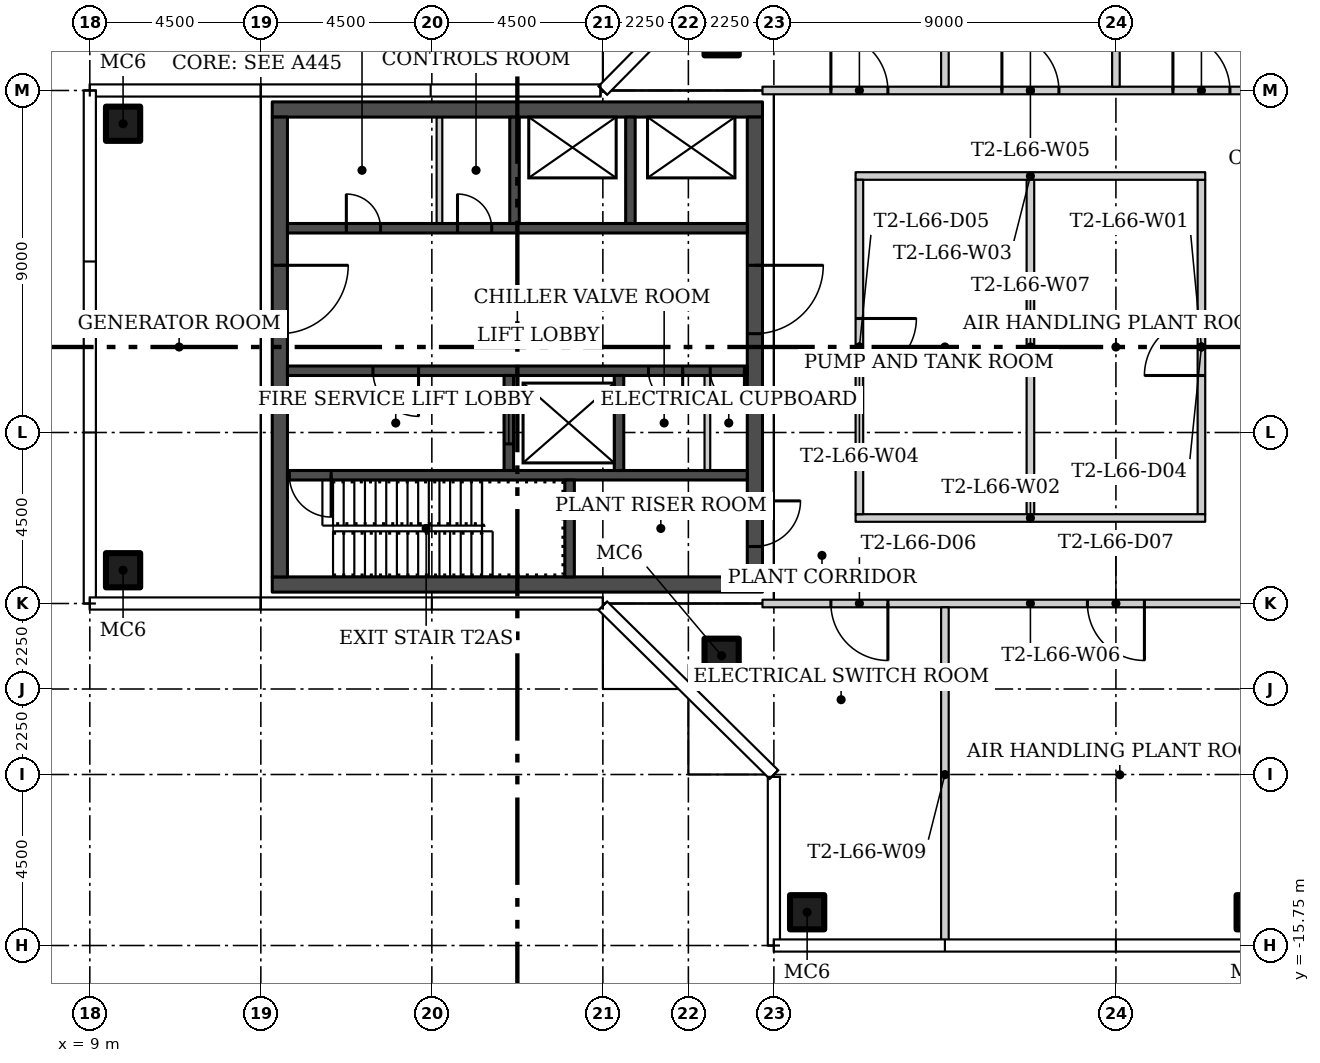
"""IFC4 building model, lengths in metres.
Left out: names, types, materials, properties, quantities, classifications, styles, units other than length and angle.
Written with IfcOpenShell. Run it as: python <this file> out.ifc"""

import sys

from ifc_helpers import new_model, si_unit, direction, frame, frame_2d, origin, origin_2d, place, context, subcontext, project, spatial, rectangle, hollow_rectangle, extrude, element, fill, save


model = new_model("IFC4")
c1 = context("Model", 3, precision=1e-05, world=origin(), true_north=direction((0.0, 1.0)))
c2 = subcontext(c1, "Body", "Model", "MODEL_VIEW")
j1 = project(units=[si_unit("LENGTHUNIT", "METRE"), si_unit("PLANEANGLEUNIT", "RADIAN")], contexts=[c1])
p1 = place(None, origin())
s1 = spatial("IfcSite", under=j1, at=p1, CompositionType="ELEMENT")
p2 = place(p1, origin())
s2 = spatial("IfcBuilding", under=s1, at=p2, CompositionType="ELEMENT")
p3 = place(p2, frame((0.0, 0.0, 273.3)))
s3 = spatial("IfcBuildingStorey", under=s2, at=p3, CompositionType="ELEMENT", Elevation=273.3)
for number, where in (
    (1, (25.625, 8.125, 0.0)),
    (2, (25.625, -8.125, 0.0)),
    (3, (39.625, -14.875, 0.0)),
    (4, (27.875, -14.875, 0.0)),
    (5, (9.875, -5.875, 0.0)),
    (6, (9.875, 5.875, 0.0)),
):
    element("IfcColumn", number, at=place(p3, frame(where)), inside=s3, PredefinedType="COLUMN", context=c2, shape_type="SweptSolid", body=[
        extrude(hollow_rectangle(XDim=0.9, YDim=0.9, WallThickness=0.036, at=origin_2d()), origin(), (0.0, 0.0, 1.0), 4.55),
    ])
p4 = place(p3, frame((38.25, -4.4, 0.0), z_axis=(0.0, 0.0, 1.0), x_axis=(0.0, 1.0, 0.0)))
e7 = element("IfcWall", 7, at=p4, inside=s3, PredefinedType="PARTITIONING", context=c2, shape_type="SweptSolid", body=[
    extrude(rectangle(XDim=8.8, YDim=0.2, at=frame_2d((4.4, 0.0))), origin(), (0.0, 0.0, 1.0), 4.55),
])
p5 = place(p4, frame((3.65, 0.0, 0.0)))
e8 = element("IfcOpeningElement", 8, at=p5, cuts=e7, PredefinedType="OPENING", context=c2, shape_type="SweptSolid", body=[
    extrude(rectangle(XDim=1.5, YDim=2.4, at=frame_2d((0.75, 1.2))), frame((0.0, 0.11, 0.0), z_axis=(0.0, -1.0, 0.0), x_axis=(1.0, 0.0, 0.0)), (0.0, 0.0, 1.0), 0.22),
])
p6 = place(p3, frame((29.15, -4.5, 0.0)))
e9 = element("IfcWall", 9, at=p6, inside=s3, PredefinedType="PARTITIONING", context=c2, shape_type="SweptSolid", body=[
    extrude(rectangle(XDim=9.2, YDim=0.2, at=frame_2d((4.6, 0.0))), origin(), (0.0, 0.0, 1.0), 4.55),
])
p7 = place(p3, frame((38.35, 4.5, 0.0), z_axis=(0.0, 0.0, 1.0), x_axis=(-1.0, 0.0, 0.0)))
e10 = element("IfcWall", 10, at=p7, inside=s3, PredefinedType="PARTITIONING", context=c2, shape_type="SweptSolid", body=[
    extrude(rectangle(XDim=9.2, YDim=0.2, at=frame_2d((4.6, 0.0))), origin(), (0.0, 0.0, 1.0), 4.55),
])
p8 = place(p3, frame((29.25, 4.4, 0.0), z_axis=(0.0, 0.0, 1.0), x_axis=(0.0, -1.0, 0.0)))
e11 = element("IfcWall", 11, at=p8, inside=s3, PredefinedType="PARTITIONING", context=c2, shape_type="SweptSolid", body=[
    extrude(rectangle(XDim=8.8, YDim=0.2, at=frame_2d((4.4, 0.0))), origin(), (0.0, 0.0, 1.0), 4.55),
])
p9 = place(p8, frame((3.65, 0.0, 0.0)))
e12 = element("IfcOpeningElement", 12, at=p9, cuts=e11, PredefinedType="OPENING", context=c2, shape_type="SweptSolid", body=[
    extrude(rectangle(XDim=1.5, YDim=2.4, at=frame_2d((0.75, 1.2))), frame((0.0, 0.11, 0.0), z_axis=(0.0, -1.0, 0.0), x_axis=(1.0, 0.0, 0.0)), (0.0, 0.0, 1.0), 0.22),
])
p10 = place(p3, frame((26.7, 6.75, 0.0)))
e13 = element("IfcWall", 13, at=p10, inside=s3, PredefinedType="PARTITIONING", context=c2, shape_type="SweptSolid", body=[
    extrude(rectangle(XDim=14.1, YDim=0.2, at=frame_2d((7.05, 0.0))), origin(), (0.0, 0.0, 1.0), 4.55),
])
p11 = place(p10, frame((10.8, 0.0, 0.0)))
e14 = element("IfcOpeningElement", 14, at=p11, cuts=e13, PredefinedType="OPENING", context=c2, shape_type="SweptSolid", body=[
    extrude(rectangle(XDim=1.5, YDim=2.4, at=frame_2d((0.75, 1.2))), frame((0.0, 0.11, 0.0), z_axis=(0.0, -1.0, 0.0), x_axis=(1.0, 0.0, 0.0)), (0.0, 0.0, 1.0), 0.22),
])
p12 = place(p10, frame((6.3, 0.0, 0.0)))
e15 = element("IfcOpeningElement", 15, at=p12, cuts=e13, PredefinedType="OPENING", context=c2, shape_type="SweptSolid", body=[
    extrude(rectangle(XDim=1.5, YDim=2.4, at=frame_2d((0.75, 1.2))), frame((0.0, 0.11, 0.0), z_axis=(0.0, -1.0, 0.0), x_axis=(1.0, 0.0, 0.0)), (0.0, 0.0, 1.0), 0.22),
])
p13 = place(p10, frame((1.8, 0.0, 0.0)))
e16 = element("IfcOpeningElement", 16, at=p13, cuts=e13, PredefinedType="OPENING", context=c2, shape_type="SweptSolid", body=[
    extrude(rectangle(XDim=1.5, YDim=2.4, at=frame_2d((0.75, 1.2))), frame((0.0, 0.11, 0.0), z_axis=(0.0, -1.0, 0.0), x_axis=(1.0, 0.0, 0.0)), (0.0, 0.0, 1.0), 0.22),
])
p14 = place(p3, frame((40.8, -6.75, 0.0), z_axis=(0.0, 0.0, 1.0), x_axis=(-1.0, 0.0, 0.0)))
e17 = element("IfcWall", 17, at=p14, inside=s3, PredefinedType="PARTITIONING", context=c2, shape_type="SweptSolid", body=[
    extrude(rectangle(XDim=14.1, YDim=0.2, at=frame_2d((7.05, 0.0))), origin(), (0.0, 0.0, 1.0), 4.55),
])
p15 = place(p14, frame((10.8, 0.0, 0.0)))
e18 = element("IfcOpeningElement", 18, at=p15, cuts=e17, PredefinedType="OPENING", context=c2, shape_type="SweptSolid", body=[
    extrude(rectangle(XDim=1.5, YDim=2.4, at=frame_2d((0.75, 1.2))), frame((0.0, 0.11, 0.0), z_axis=(0.0, -1.0, 0.0), x_axis=(1.0, 0.0, 0.0)), (0.0, 0.0, 1.0), 0.22),
])
p16 = place(p14, frame((4.05, 0.0, 0.0)))
e19 = element("IfcOpeningElement", 19, at=p16, cuts=e17, PredefinedType="OPENING", context=c2, shape_type="SweptSolid", body=[
    extrude(rectangle(XDim=1.5, YDim=2.4, at=frame_2d((0.75, 1.2))), frame((0.0, 0.11, 0.0), z_axis=(0.0, -1.0, 0.0), x_axis=(1.0, 0.0, 0.0)), (0.0, 0.0, 1.0), 0.22),
])
p17 = place(p3, frame((33.75, 4.4, 0.0), z_axis=(0.0, 0.0, 1.0), x_axis=(0.0, -1.0, 0.0)))
e20 = element("IfcWall", 20, at=p17, inside=s3, PredefinedType="PARTITIONING", context=c2, shape_type="SweptSolid", body=[
    extrude(rectangle(XDim=8.8, YDim=0.2, at=frame_2d((4.4, 0.0))), origin(), (0.0, 0.0, 1.0), 4.55),
])
p18 = place(p3, frame((36.0, 20.155, 0.0), z_axis=(0.0, 0.0, 1.0), x_axis=(0.0, -1.0, 0.0)))
e21 = element("IfcWall", 21, at=p18, inside=s3, PredefinedType="PARTITIONING", context=c2, shape_type="SweptSolid", body=[
    extrude(rectangle(XDim=13.305, YDim=0.2, at=frame_2d((6.652, 0.0))), origin(), (0.0, 0.0, 1.0), 4.55),
])
p19 = place(p3, frame((31.5, -6.85, 0.0), z_axis=(0.0, 0.0, 1.0), x_axis=(0.0, -1.0, 0.0)))
e22 = element("IfcWall", 22, at=p19, inside=s3, PredefinedType="PARTITIONING", context=c2, shape_type="SweptSolid", body=[
    extrude(rectangle(XDim=8.805, YDim=0.2, at=frame_2d((4.402, 0.0))), origin(), (0.0, 0.0, 1.0), 4.55),
])
p20 = place(p3, frame((31.5, 20.155, 0.0), z_axis=(0.0, 0.0, 1.0), x_axis=(0.0, -1.0, 0.0)))
e23 = element("IfcWall", 23, at=p20, inside=s3, PredefinedType="PARTITIONING", context=c2, shape_type="SweptSolid", body=[
    extrude(rectangle(XDim=13.305, YDim=0.2, at=frame_2d((6.652, 0.0))), origin(), (0.0, 0.0, 1.0), 4.55),
])
for number, where in (
    (24, (13.8, -6.25, 0.0)),
    (25, (13.8, 6.25, 0.0)),
):
    element("IfcWall", number, at=place(p3, frame(where)), inside=s3, PredefinedType="SHEAR", context=c2, shape_type="SweptSolid", body=[
        extrude(rectangle(XDim=12.9, YDim=0.4, at=frame_2d((6.45, 0.0))), origin(), (0.0, 0.0, 1.0), 4.55),
    ])
p21 = place(p3, frame((14.0, 6.05, 0.0), z_axis=(0.0, 0.0, 1.0), x_axis=(0.0, -1.0, 0.0)))
e26 = element("IfcWall", 26, at=p21, inside=s3, PredefinedType="SHEAR", context=c2, shape_type="SweptSolid", body=[
    extrude(rectangle(XDim=12.1, YDim=0.4, at=frame_2d((6.05, 0.0))), origin(), (0.0, 0.0, 1.0), 4.55),
])
p22 = place(p21, frame((3.9, 0.0, 0.0)))
e27 = element("IfcOpeningElement", 27, at=p22, cuts=e26, PredefinedType="OPENING", context=c2, shape_type="SweptSolid", body=[
    extrude(rectangle(XDim=1.8, YDim=2.4, at=frame_2d((0.9, 1.2))), frame((0.0, 0.21, 0.0), z_axis=(0.0, -1.0, 0.0), x_axis=(1.0, 0.0, 0.0)), (0.0, 0.0, 1.0), 0.42),
])
p23 = place(p3, frame((26.5, 6.05, 0.0), z_axis=(0.0, 0.0, 1.0), x_axis=(0.0, -1.0, 0.0)))
e28 = element("IfcWall", 28, at=p23, inside=s3, PredefinedType="SHEAR", context=c2, shape_type="SweptSolid", body=[
    extrude(rectangle(XDim=12.1, YDim=0.4, at=frame_2d((6.05, 0.0))), origin(), (0.0, 0.0, 1.0), 4.55),
])
p24 = place(p23, frame((10.1, 0.0, 0.0)))
e29 = element("IfcOpeningElement", 29, at=p24, cuts=e28, PredefinedType="OPENING", context=c2, shape_type="SweptSolid", body=[
    extrude(rectangle(XDim=1.2, YDim=2.1, at=frame_2d((0.6, 1.05))), frame((0.0, 0.21, 0.0), z_axis=(0.0, -1.0, 0.0), x_axis=(1.0, 0.0, 0.0)), (0.0, 0.0, 1.0), 0.42),
])
p25 = place(p23, frame((3.9, 0.0, 0.0)))
e30 = element("IfcOpeningElement", 30, at=p25, cuts=e28, PredefinedType="OPENING", context=c2, shape_type="SweptSolid", body=[
    extrude(rectangle(XDim=1.8, YDim=2.4, at=frame_2d((0.9, 1.2))), frame((0.0, 0.21, 0.0), z_axis=(0.0, -1.0, 0.0), x_axis=(1.0, 0.0, 0.0)), (0.0, 0.0, 1.0), 0.42),
])
p26 = place(p3, frame((26.3, -3.375, 0.0), z_axis=(0.0, 0.0, 1.0), x_axis=(-1.0, 0.0, 0.0)))
e31 = element("IfcWall", 31, at=p26, inside=s3, PredefinedType="SHEAR", context=c2, shape_type="SweptSolid", body=[
    extrude(rectangle(XDim=12.1, YDim=0.25, at=frame_2d((6.05, 0.0))), origin(), (0.0, 0.0, 1.0), 4.55),
])
p27 = place(p26, frame((10.95, 0.0, 0.0)))
e32 = element("IfcOpeningElement", 32, at=p27, cuts=e31, PredefinedType="OPENING", context=c2, shape_type="SweptSolid", body=[
    extrude(rectangle(XDim=1.1, YDim=2.1, at=frame_2d((0.55, 1.05))), frame((0.0, 0.135, 0.0), z_axis=(0.0, -1.0, 0.0), x_axis=(1.0, 0.0, 0.0)), (0.0, 0.0, 1.0), 0.27),
])
p28 = place(p3, frame((21.625, -6.05, 0.0), z_axis=(0.0, 0.0, 1.0), x_axis=(0.0, 1.0, 0.0)))
e33 = element("IfcWall", 33, at=p28, inside=s3, PredefinedType="SHEAR", context=c2, shape_type="SweptSolid", body=[
    extrude(rectangle(XDim=2.55, YDim=0.25, at=frame_2d((1.275, 0.0))), origin(), (0.0, 0.0, 1.0), 4.55),
])
p29 = place(p3, frame((26.3, -0.625, 0.0), z_axis=(0.0, 0.0, 1.0), x_axis=(-1.0, 0.0, 0.0)))
e34 = element("IfcWall", 34, at=p29, inside=s3, PredefinedType="SHEAR", context=c2, shape_type="SweptSolid", body=[
    extrude(rectangle(XDim=12.1, YDim=0.25, at=frame_2d((6.05, 0.0))), origin(), (0.0, 0.0, 1.0), 4.55),
])
p30 = place(p29, frame((8.65, 0.0, 0.0)))
e35 = element("IfcOpeningElement", 35, at=p30, cuts=e34, PredefinedType="OPENING", context=c2, shape_type="SweptSolid", body=[
    extrude(rectangle(XDim=1.2, YDim=2.1, at=frame_2d((0.6, 1.05))), frame((0.0, 0.135, 0.0), z_axis=(0.0, -1.0, 0.0), x_axis=(1.0, 0.0, 0.0)), (0.0, 0.0, 1.0), 0.27),
])
p31 = place(p29, frame((1.7, 0.0, 0.0)))
e36 = element("IfcOpeningElement", 36, at=p31, cuts=e34, PredefinedType="OPENING", context=c2, shape_type="SweptSolid", body=[
    extrude(rectangle(XDim=0.9, YDim=2.1, at=frame_2d((0.45, 1.05))), frame((0.0, 0.135, 0.0), z_axis=(0.0, -1.0, 0.0), x_axis=(1.0, 0.0, 0.0)), (0.0, 0.0, 1.0), 0.27),
])
p32 = place(p29, frame((0.075, 0.0, 0.0)))
e37 = element("IfcOpeningElement", 37, at=p32, cuts=e34, PredefinedType="OPENING", context=c2, shape_type="SweptSolid", body=[
    extrude(rectangle(XDim=0.9, YDim=2.1, at=frame_2d((0.45, 1.05))), frame((0.0, 0.135, 0.0), z_axis=(0.0, -1.0, 0.0), x_axis=(1.0, 0.0, 0.0)), (0.0, 0.0, 1.0), 0.27),
])
p33 = place(p3, frame((20.025, -3.25, 0.0), z_axis=(0.0, 0.0, 1.0), x_axis=(0.0, 1.0, 0.0)))
e38 = element("IfcWall", 38, at=p33, inside=s3, PredefinedType="SHEAR", context=c2, shape_type="SweptSolid", body=[
    extrude(rectangle(XDim=2.5, YDim=0.25, at=frame_2d((1.25, 0.0))), origin(), (0.0, 0.0, 1.0), 4.55),
])
p34 = place(p33, frame((0.7, 0.0, 0.0)))
e39 = element("IfcOpeningElement", 39, at=p34, cuts=e38, PredefinedType="OPENING", context=c2, shape_type="SweptSolid", body=[
    extrude(rectangle(XDim=1.1, YDim=2.1, at=frame_2d((0.55, 1.05))), frame((0.0, 0.135, 0.0), z_axis=(0.0, -1.0, 0.0), x_axis=(1.0, 0.0, 0.0)), (0.0, 0.0, 1.0), 0.27),
])
p35 = place(p3, frame((22.925, -3.25, 0.0), z_axis=(0.0, 0.0, 1.0), x_axis=(0.0, 1.0, 0.0)))
e40 = element("IfcWall", 40, at=p35, inside=s3, PredefinedType="SHEAR", context=c2, shape_type="SweptSolid", body=[
    extrude(rectangle(XDim=2.5, YDim=0.25, at=frame_2d((1.25, 0.0))), origin(), (0.0, 0.0, 1.0), 4.55),
])
p36 = place(p3, frame((25.25, -3.25, 0.0), z_axis=(0.0, 0.0, 1.0), x_axis=(0.0, 1.0, 0.0)))
e41 = element("IfcWall", 41, at=p36, inside=s3, PredefinedType="PARTITIONING", context=c2, shape_type="SweptSolid", body=[
    extrude(rectangle(XDim=2.5, YDim=0.15, at=frame_2d((1.25, 0.0))), origin(), (0.0, 0.0, 1.0), 4.55),
])
p37 = place(p3, frame((14.2, 3.125, 0.0)))
e42 = element("IfcWall", 42, at=p37, inside=s3, PredefinedType="SHEAR", context=c2, shape_type="SweptSolid", body=[
    extrude(rectangle(XDim=12.1, YDim=0.25, at=frame_2d((6.05, 0.0))), origin(), (0.0, 0.0, 1.0), 4.55),
])
p38 = place(p37, frame((1.55, 0.0, 0.0)))
e43 = element("IfcOpeningElement", 43, at=p38, cuts=e42, PredefinedType="OPENING", context=c2, shape_type="SweptSolid", body=[
    extrude(rectangle(XDim=0.9, YDim=2.1, at=frame_2d((0.45, 1.05))), frame((0.0, 0.135, 0.0), z_axis=(0.0, -1.0, 0.0), x_axis=(1.0, 0.0, 0.0)), (0.0, 0.0, 1.0), 0.27),
])
p39 = place(p37, frame((4.475, 0.0, 0.0)))
e44 = element("IfcOpeningElement", 44, at=p39, cuts=e42, PredefinedType="OPENING", context=c2, shape_type="SweptSolid", body=[
    extrude(rectangle(XDim=0.9, YDim=2.1, at=frame_2d((0.45, 1.05))), frame((0.0, 0.135, 0.0), z_axis=(0.0, -1.0, 0.0), x_axis=(1.0, 0.0, 0.0)), (0.0, 0.0, 1.0), 0.27),
])
for number, where, z_axis, x_axis in (
    (45, (20.175, 3.25, 0.0), (0.0, 0.0, 1.0), (0.0, 1.0, 0.0)),
    (46, (23.225, 3.25, 0.0), (0.0, 0.0, 1.0), (0.0, 1.0, 0.0)),
):
    element("IfcWall", number, at=place(p3, frame(where, z_axis=z_axis, x_axis=x_axis)), inside=s3, PredefinedType="SHEAR", context=c2, shape_type="SweptSolid", body=[
        extrude(rectangle(XDim=2.8, YDim=0.25, at=frame_2d((1.4, 0.0))), origin(), (0.0, 0.0, 1.0), 4.55),
    ])
p40 = place(p3, frame((18.2, 3.25, 0.0), z_axis=(0.0, 0.0, 1.0), x_axis=(0.0, 1.0, 0.0)))
e47 = element("IfcWall", 47, at=p40, inside=s3, PredefinedType="PARTITIONING", context=c2, shape_type="SweptSolid", body=[
    extrude(rectangle(XDim=2.8, YDim=0.15, at=frame_2d((1.4, 0.0))), origin(), (0.0, 0.0, 1.0), 4.55),
])
p41 = place(p11, origin())
e48 = element("IfcDoor", 48, at=p41, inside=s3, OperationType="DOUBLE_DOOR_SINGLE_SWING", PredefinedType="DOOR", context=c2, shape_type="SweptSolid", body=[
    extrude(rectangle(XDim=1.5, YDim=2.4, at=frame_2d((0.75, 1.2))), frame((0.0, 0.025, 0.0), z_axis=(0.0, -1.0, 0.0), x_axis=(1.0, 0.0, 0.0)), (0.0, 0.0, 1.0), 0.05),
])
fill(e14, e48)
p42 = place(p12, origin())
e49 = element("IfcDoor", 49, at=p42, inside=s3, OperationType="DOUBLE_DOOR_SINGLE_SWING", PredefinedType="DOOR", context=c2, shape_type="SweptSolid", body=[
    extrude(rectangle(XDim=1.5, YDim=2.4, at=frame_2d((0.75, 1.2))), frame((0.0, 0.025, 0.0), z_axis=(0.0, -1.0, 0.0), x_axis=(1.0, 0.0, 0.0)), (0.0, 0.0, 1.0), 0.05),
])
fill(e15, e49)
p43 = place(p13, origin())
e50 = element("IfcDoor", 50, at=p43, inside=s3, OperationType="DOUBLE_DOOR_SINGLE_SWING", PredefinedType="DOOR", context=c2, shape_type="SweptSolid", body=[
    extrude(rectangle(XDim=1.5, YDim=2.4, at=frame_2d((0.75, 1.2))), frame((0.0, 0.025, 0.0), z_axis=(0.0, -1.0, 0.0), x_axis=(1.0, 0.0, 0.0)), (0.0, 0.0, 1.0), 0.05),
])
fill(e16, e50)
p44 = place(p5, origin())
e51 = element("IfcDoor", 51, at=p44, inside=s3, OperationType="DOUBLE_DOOR_SINGLE_SWING", PredefinedType="DOOR", context=c2, shape_type="SweptSolid", body=[
    extrude(rectangle(XDim=1.5, YDim=2.4, at=frame_2d((0.75, 1.2))), frame((0.0, 0.025, 0.0), z_axis=(0.0, -1.0, 0.0), x_axis=(1.0, 0.0, 0.0)), (0.0, 0.0, 1.0), 0.05),
])
fill(e8, e51)
p45 = place(p9, origin())
e52 = element("IfcDoor", 52, at=p45, inside=s3, OperationType="DOUBLE_DOOR_SINGLE_SWING", PredefinedType="DOOR", context=c2, shape_type="SweptSolid", body=[
    extrude(rectangle(XDim=1.5, YDim=2.4, at=frame_2d((0.75, 1.2))), frame((0.0, 0.025, 0.0), z_axis=(0.0, -1.0, 0.0), x_axis=(1.0, 0.0, 0.0)), (0.0, 0.0, 1.0), 0.05),
])
fill(e12, e52)
p46 = place(p15, origin())
e53 = element("IfcDoor", 53, at=p46, inside=s3, OperationType="DOUBLE_DOOR_SINGLE_SWING", PredefinedType="DOOR", context=c2, shape_type="SweptSolid", body=[
    extrude(rectangle(XDim=1.5, YDim=2.4, at=frame_2d((0.75, 1.2))), frame((0.0, 0.025, 0.0), z_axis=(0.0, -1.0, 0.0), x_axis=(1.0, 0.0, 0.0)), (0.0, 0.0, 1.0), 0.05),
])
fill(e18, e53)
p47 = place(p16, origin())
e54 = element("IfcDoor", 54, at=p47, inside=s3, OperationType="DOUBLE_DOOR_SINGLE_SWING", PredefinedType="DOOR", context=c2, shape_type="SweptSolid", body=[
    extrude(rectangle(XDim=1.5, YDim=2.4, at=frame_2d((0.75, 1.2))), frame((0.0, 0.025, 0.0), z_axis=(0.0, -1.0, 0.0), x_axis=(1.0, 0.0, 0.0)), (0.0, 0.0, 1.0), 0.05),
])
fill(e19, e54)
p48 = place(p22, origin())
e55 = element("IfcDoor", 55, at=p48, inside=s3, OperationType="DOUBLE_DOOR_SINGLE_SWING", PredefinedType="DOOR", context=c2, shape_type="SweptSolid", body=[
    extrude(rectangle(XDim=1.8, YDim=2.4, at=frame_2d((0.9, 1.2))), frame((0.0, 0.025, 0.0), z_axis=(0.0, -1.0, 0.0), x_axis=(1.0, 0.0, 0.0)), (0.0, 0.0, 1.0), 0.05),
])
fill(e27, e55)
p49 = place(p24, origin())
e56 = element("IfcDoor", 56, at=p49, inside=s3, OperationType="SINGLE_SWING_RIGHT", PredefinedType="DOOR", context=c2, shape_type="SweptSolid", body=[
    extrude(rectangle(XDim=1.2, YDim=2.1, at=frame_2d((0.6, 1.05))), frame((0.0, 0.025, 0.0), z_axis=(0.0, -1.0, 0.0), x_axis=(1.0, 0.0, 0.0)), (0.0, 0.0, 1.0), 0.05),
])
fill(e29, e56)
p50 = place(p25, origin())
e57 = element("IfcDoor", 57, at=p50, inside=s3, OperationType="DOUBLE_DOOR_SINGLE_SWING", PredefinedType="DOOR", context=c2, shape_type="SweptSolid", body=[
    extrude(rectangle(XDim=1.8, YDim=2.4, at=frame_2d((0.9, 1.2))), frame((0.0, 0.025, 0.0), z_axis=(0.0, -1.0, 0.0), x_axis=(1.0, 0.0, 0.0)), (0.0, 0.0, 1.0), 0.05),
])
fill(e30, e57)
p51 = place(p27, origin())
e58 = element("IfcDoor", 58, at=p51, inside=s3, OperationType="SINGLE_SWING_RIGHT", PredefinedType="DOOR", context=c2, shape_type="SweptSolid", body=[
    extrude(rectangle(XDim=1.1, YDim=2.1, at=frame_2d((0.55, 1.05))), frame((0.0, 0.025, 0.0), z_axis=(0.0, -1.0, 0.0), x_axis=(1.0, 0.0, 0.0)), (0.0, 0.0, 1.0), 0.05),
])
fill(e32, e58)
p52 = place(p30, origin())
e59 = element("IfcDoor", 59, at=p52, inside=s3, OperationType="SINGLE_SWING_RIGHT", PredefinedType="DOOR", context=c2, shape_type="SweptSolid", body=[
    extrude(rectangle(XDim=1.2, YDim=2.1, at=frame_2d((0.6, 1.05))), frame((0.0, 0.025, 0.0), z_axis=(0.0, -1.0, 0.0), x_axis=(1.0, 0.0, 0.0)), (0.0, 0.0, 1.0), 0.05),
])
fill(e35, e59)
p53 = place(p31, origin())
e60 = element("IfcDoor", 60, at=p53, inside=s3, OperationType="SINGLE_SWING_LEFT", PredefinedType="DOOR", context=c2, shape_type="SweptSolid", body=[
    extrude(rectangle(XDim=0.9, YDim=2.1, at=frame_2d((0.45, 1.05))), frame((0.0, 0.025, 0.0), z_axis=(0.0, -1.0, 0.0), x_axis=(1.0, 0.0, 0.0)), (0.0, 0.0, 1.0), 0.05),
])
fill(e36, e60)
p54 = place(p32, origin())
e61 = element("IfcDoor", 61, at=p54, inside=s3, OperationType="SINGLE_SWING_LEFT", PredefinedType="DOOR", context=c2, shape_type="SweptSolid", body=[
    extrude(rectangle(XDim=0.9, YDim=2.1, at=frame_2d((0.45, 1.05))), frame((0.0, 0.025, 0.0), z_axis=(0.0, -1.0, 0.0), x_axis=(1.0, 0.0, 0.0)), (0.0, 0.0, 1.0), 0.05),
])
fill(e37, e61)
p55 = place(p34, origin())
e62 = element("IfcDoor", 62, at=p55, inside=s3, OperationType="SLIDING_TO_LEFT", PredefinedType="DOOR", context=c2, shape_type="SweptSolid", body=[
    extrude(rectangle(XDim=1.1, YDim=2.1, at=frame_2d((0.55, 1.05))), frame((0.0, 0.025, 0.0), z_axis=(0.0, -1.0, 0.0), x_axis=(1.0, 0.0, 0.0)), (0.0, 0.0, 1.0), 0.05),
])
fill(e39, e62)
p56 = place(p38, origin())
e63 = element("IfcDoor", 63, at=p56, inside=s3, OperationType="SINGLE_SWING_LEFT", PredefinedType="DOOR", context=c2, shape_type="SweptSolid", body=[
    extrude(rectangle(XDim=0.9, YDim=2.1, at=frame_2d((0.45, 1.05))), frame((0.0, 0.025, 0.0), z_axis=(0.0, -1.0, 0.0), x_axis=(1.0, 0.0, 0.0)), (0.0, 0.0, 1.0), 0.05),
])
fill(e43, e63)
p57 = place(p39, origin())
e64 = element("IfcDoor", 64, at=p57, inside=s3, OperationType="SINGLE_SWING_LEFT", PredefinedType="DOOR", context=c2, shape_type="SweptSolid", body=[
    extrude(rectangle(XDim=0.9, YDim=2.1, at=frame_2d((0.45, 1.05))), frame((0.0, 0.025, 0.0), z_axis=(0.0, -1.0, 0.0), x_axis=(1.0, 0.0, 0.0)), (0.0, 0.0, 1.0), 0.05),
])
fill(e44, e64)
save(model, sys.argv[1])
